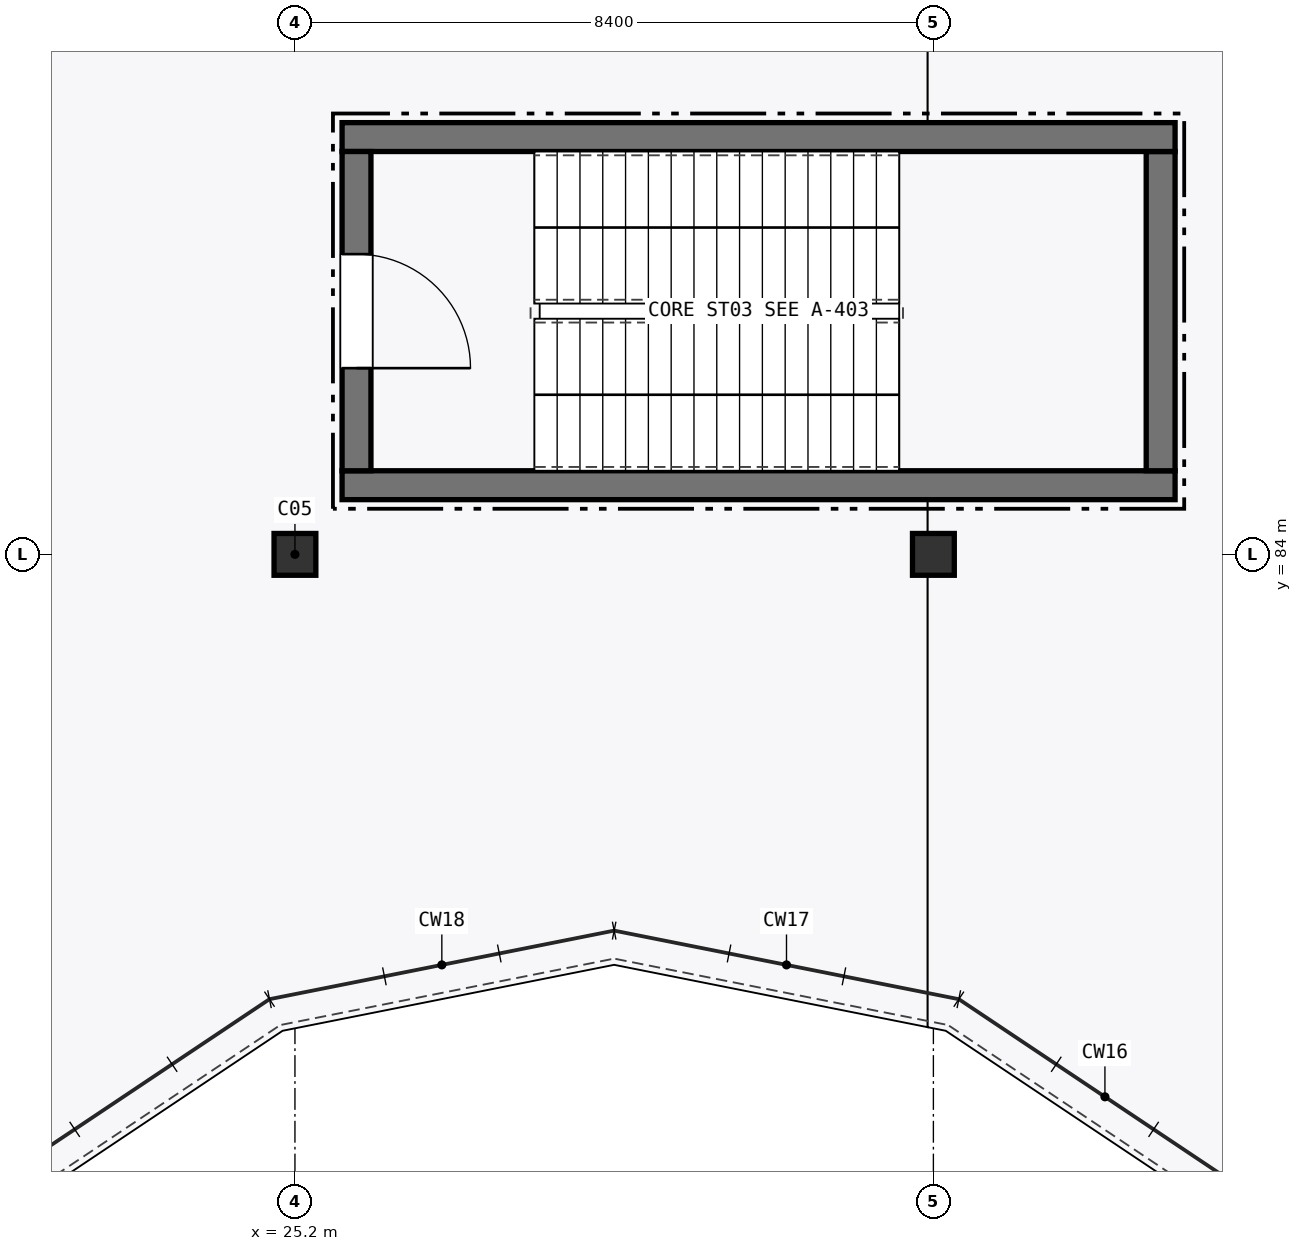
"""IFC4 building model, lengths in metres.
Left out: names, types, materials, properties, quantities, classifications, styles, units other than length and angle.
Written with IfcOpenShell. Run it as: python <this file> out.ifc"""

import sys

from ifc_helpers import new_model, si_unit, direction, frame, frame_2d, origin, origin_2d, place, context, subcontext, project, spatial, rectangle, hollow_rectangle, extrude, element, fill, save


model = new_model("IFC4")
c1 = context("Model", 3, precision=1e-05, world=origin(), true_north=direction((0.0, 1.0)))
c2 = subcontext(c1, "Body", "Model", "MODEL_VIEW")
j1 = project(units=[si_unit("LENGTHUNIT", "METRE"), si_unit("PLANEANGLEUNIT", "RADIAN")], contexts=[c1])
p1 = place(None, origin())
s1 = spatial("IfcSite", under=j1, at=p1, CompositionType="ELEMENT")
p2 = place(p1, origin())
s2 = spatial("IfcBuilding", under=s1, at=p2, CompositionType="ELEMENT")
p3 = place(p2, frame((0.0, 0.0, 16.5)))
s3 = spatial("IfcBuildingStorey", under=s2, at=p3, CompositionType="ELEMENT", Elevation=16.5)
for number, where, z_axis, x_axis in (
    (1, (25.2, 84.0, 0.0), (0.0, 0.0, 1.0), (1.0, 0.0, 0.0)),
    (2, (33.6, 84.0, 0.0), (0.0, 0.0, 1.0), (1.0, 0.0, 0.0)),
):
    element("IfcColumn", number, at=place(p3, frame(where, z_axis=z_axis, x_axis=x_axis)), inside=s3, PredefinedType="COLUMN", context=c2, shape_type="SweptSolid", body=[
        extrude(hollow_rectangle(XDim=0.55, YDim=0.55, WallThickness=0.022, at=origin_2d()), origin(), (0.0, 0.0, 1.0), 5.1),
    ])
p4 = place(p3, frame((25.82, 84.91, 0.0), z_axis=(0.0, 0.0, 1.0), x_axis=(1.0, 0.0, 0.0)))
e3 = element("IfcWall", 3, at=p4, inside=s3, PredefinedType="SHEAR", context=c2, shape_type="SweptSolid", body=[
    extrude(rectangle(XDim=10.96, YDim=0.38, at=frame_2d((5.48, 0.0))), origin(), (0.0, 0.0, 1.0), 4.845),
])
p5 = place(p3, frame((36.59, 85.1, 0.0), z_axis=(0.0, 0.0, 1.0), x_axis=(0.0, 1.0, 0.0)))
e4 = element("IfcWall", 4, at=p5, inside=s3, PredefinedType="SHEAR", context=c2, shape_type="SweptSolid", body=[
    extrude(rectangle(XDim=4.2, YDim=0.38, at=frame_2d((2.1, 0.0))), origin(), (0.0, 0.0, 1.0), 4.845),
])
p6 = place(p3, frame((36.78, 89.49, 0.0), z_axis=(0.0, 0.0, 1.0), x_axis=(-1.0, 0.0, 0.0)))
e5 = element("IfcWall", 5, at=p6, inside=s3, PredefinedType="SHEAR", context=c2, shape_type="SweptSolid", body=[
    extrude(rectangle(XDim=10.96, YDim=0.38, at=frame_2d((5.48, 0.0))), origin(), (0.0, 0.0, 1.0), 4.845),
])
p7 = place(p3, frame((26.01, 89.3, 0.0), z_axis=(0.0, 0.0, 1.0), x_axis=(0.0, -1.0, 0.0)))
e6 = element("IfcWall", 6, at=p7, inside=s3, PredefinedType="SHEAR", context=c2, shape_type="SweptSolid", body=[
    extrude(rectangle(XDim=4.2, YDim=0.38, at=frame_2d((2.1, 0.0))), origin(), (0.0, 0.0, 1.0), 4.845),
])
p8 = place(p7, frame((1.35, 0.0, 0.0)))
e7 = element("IfcOpeningElement", 7, at=p8, cuts=e6, PredefinedType="OPENING", context=c2, shape_type="SweptSolid", body=[
    extrude(rectangle(XDim=1.5, YDim=2.15, at=frame_2d((0.75, 1.075))), frame((0.0, 0.2, 0.0), z_axis=(0.0, -1.0, 0.0), x_axis=(1.0, 0.0, 0.0)), (0.0, 0.0, 1.0), 0.4),
])
p9 = place(p8, origin())
e8 = element("IfcDoor", 8, at=p9, inside=s3, OperationType="SINGLE_SWING_RIGHT", PredefinedType="DOOR", context=c2, shape_type="SweptSolid", body=[
    extrude(rectangle(XDim=1.5, YDim=2.15, at=frame_2d((0.75, 1.075))), frame((0.0, 0.025, 0.0), z_axis=(0.0, -1.0, 0.0), x_axis=(1.0, 0.0, 0.0)), (0.0, 0.0, 1.0), 0.05),
])
fill(e7, e8)
save(model, sys.argv[1])
